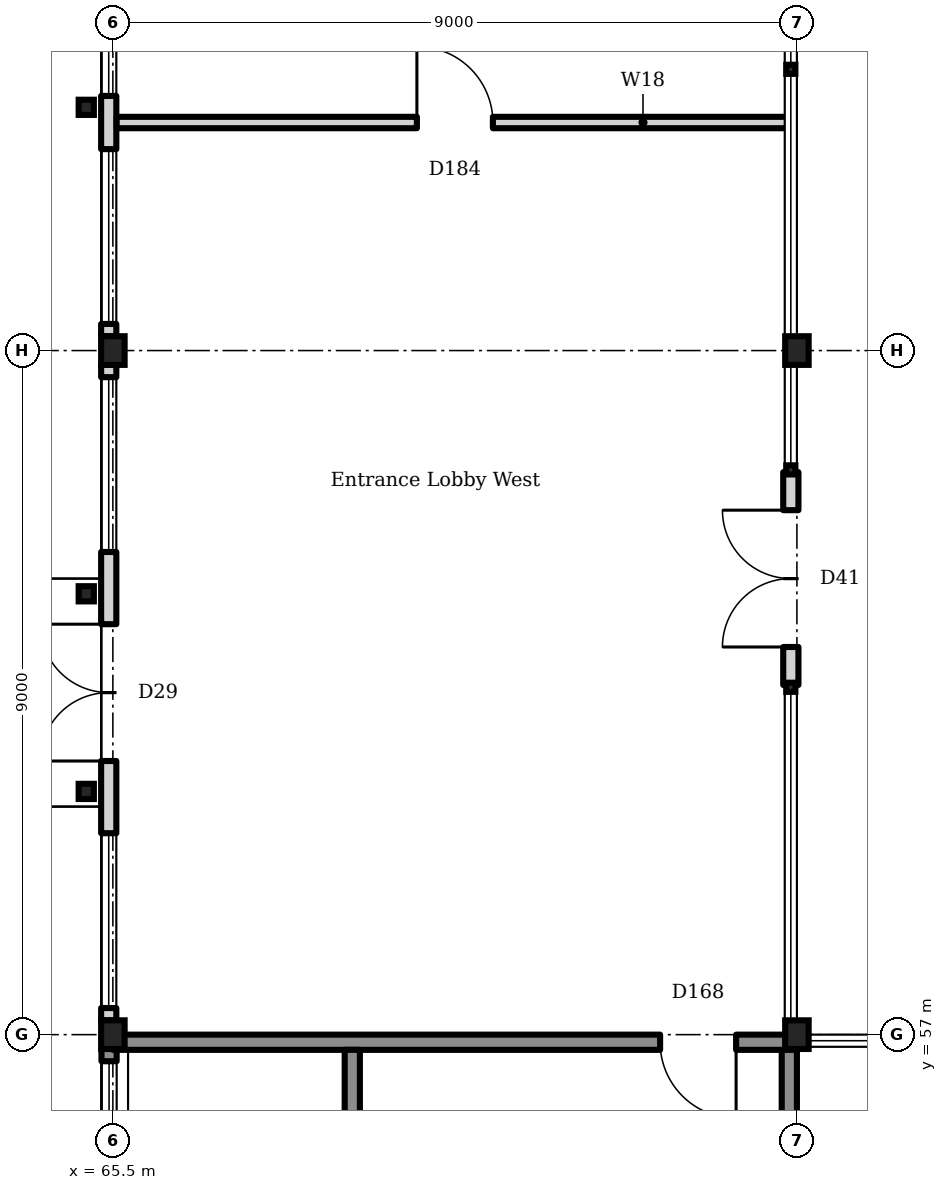
"""IFC4 building model, lengths in metres.
Left out: names, types, materials, properties, quantities, classifications, styles, units other than length and angle.
Written with IfcOpenShell. Run it as: python <this file> out.ifc"""

import sys

from ifc_helpers import new_model, si_unit, direction, frame, frame_2d, origin, origin_2d, place, context, subcontext, project, spatial, rectangle, hollow_rectangle, i_section, extrude, element, fill, save


model = new_model("IFC4")
c1 = context("Model", 3, precision=1e-05, world=origin(), true_north=direction((0.0, 1.0)))
c2 = subcontext(c1, "Body", "Model", "MODEL_VIEW")
j1 = project(units=[si_unit("LENGTHUNIT", "METRE"), si_unit("PLANEANGLEUNIT", "RADIAN")], contexts=[c1])
p1 = place(None, origin())
s1 = spatial("IfcSite", under=j1, at=p1, CompositionType="ELEMENT")
p2 = place(p1, origin())
s2 = spatial("IfcBuilding", under=s1, at=p2, CompositionType="ELEMENT")
p3 = place(p2, origin())
s3 = spatial("IfcBuildingStorey", under=s2, at=p3, CompositionType="ELEMENT", Elevation=0.0)
for number, where, z_axis, x_axis in (
    (1, (65.5, 57.0, 0.0), (0.0, 0.0, 1.0), (1.0, 0.0, 0.0)),
    (2, (74.5, 57.0, 0.0), (0.0, 0.0, 1.0), (1.0, 0.0, 0.0)),
    (3, (65.5, 66.0, 0.0), (0.0, 0.0, 1.0), (1.0, 0.0, 0.0)),
    (4, (74.5, 66.0, 0.0), (0.0, 0.0, 1.0), (1.0, 0.0, 0.0)),
):
    element("IfcColumn", number, at=place(p3, frame(where, z_axis=z_axis, x_axis=x_axis)), inside=s3, PredefinedType="COLUMN", context=c2, shape_type="SweptSolid", body=[
        extrude(i_section(OverallWidth=0.309, OverallDepth=0.377, WebThickness=0.021, FlangeThickness=0.04, FilletRadius=0.027, at=origin_2d()), origin(), (0.0, 0.0, 1.0), 5.4),
    ])
p4 = place(p3, frame((65.45, 48.32, 0.0), z_axis=(0.0, 0.0, 1.0), x_axis=(0.0, 1.0, 0.0)))
e5 = element("IfcWall", 5, at=p4, inside=s3, PredefinedType="SOLIDWALL", context=c2, shape_type="SweptSolid", body=[
    extrude(rectangle(XDim=8.491, YDim=0.2, at=frame_2d((4.246, 0.0))), origin(), (0.0, 0.0, 1.0), 5.2),
])
p5 = place(p4, frame((3.03, 0.0, 0.9)))
e6 = element("IfcOpeningElement", 6, at=p5, cuts=e5, PredefinedType="OPENING", context=c2, shape_type="SweptSolid", body=[
    extrude(rectangle(XDim=2.3, YDim=3.6, at=frame_2d((1.15, 1.8))), frame((0.0, 0.11, 0.0), z_axis=(0.0, -1.0, 0.0), x_axis=(1.0, 0.0, 0.0)), (0.0, 0.0, 1.0), 0.22),
])
p6 = place(p4, frame((6.03, 0.0, 0.9)))
e7 = element("IfcOpeningElement", 7, at=p6, cuts=e5, PredefinedType="OPENING", context=c2, shape_type="SweptSolid", body=[
    extrude(rectangle(XDim=2.3, YDim=3.6, at=frame_2d((1.15, 1.8))), frame((0.0, 0.11, 0.0), z_axis=(0.0, -1.0, 0.0), x_axis=(1.0, 0.0, 0.0)), (0.0, 0.0, 1.0), 0.22),
])
p7 = place(p3, frame((65.446, 57.188, 0.0), z_axis=(0.0, 0.0, 1.0), x_axis=(0.0, 1.0, 0.0)))
e8 = element("IfcWall", 8, at=p7, inside=s3, PredefinedType="SOLIDWALL", context=c2, shape_type="SweptSolid", body=[
    extrude(rectangle(XDim=8.623, YDim=0.2, at=frame_2d((4.312, 0.0))), origin(), (0.0, 0.0, 1.0), 4.65),
])
p8 = place(p7, frame((3.412, 0.0, 0.0)))
e9 = element("IfcOpeningElement", 9, at=p8, cuts=e8, PredefinedType="OPENING", context=c2, shape_type="SweptSolid", body=[
    extrude(rectangle(XDim=1.8, YDim=2.1, at=frame_2d((0.9, 1.05))), frame((0.0, 0.11, 0.0), z_axis=(0.0, -1.0, 0.0), x_axis=(1.0, 0.0, 0.0)), (0.0, 0.0, 1.0), 0.22),
])
p9 = place(p7, frame((0.162, 0.0, 0.9)))
e10 = element("IfcOpeningElement", 10, at=p9, cuts=e8, PredefinedType="OPENING", context=c2, shape_type="SweptSolid", body=[
    extrude(rectangle(XDim=2.3, YDim=3.6, at=frame_2d((1.15, 1.8))), frame((0.0, 0.11, 0.0), z_axis=(0.0, -1.0, 0.0), x_axis=(1.0, 0.0, 0.0)), (0.0, 0.0, 1.0), 0.22),
])
p10 = place(p7, frame((6.162, 0.0, 0.9)))
e11 = element("IfcOpeningElement", 11, at=p10, cuts=e8, PredefinedType="OPENING", context=c2, shape_type="SweptSolid", body=[
    extrude(rectangle(XDim=2.3, YDim=3.6, at=frame_2d((1.15, 1.8))), frame((0.0, 0.11, 0.0), z_axis=(0.0, -1.0, 0.0), x_axis=(1.0, 0.0, 0.0)), (0.0, 0.0, 1.0), 0.22),
])
p11 = place(p3, frame((65.446, 66.188, 0.0), z_axis=(0.0, 0.0, 1.0), x_axis=(0.0, 1.0, 0.0)))
e12 = element("IfcWall", 12, at=p11, inside=s3, PredefinedType="SOLIDWALL", context=c2, shape_type="SweptSolid", body=[
    extrude(rectangle(XDim=8.595, YDim=0.2, at=frame_2d((4.298, 0.0))), origin(), (0.0, 0.0, 1.0), 4.65),
])
p12 = place(p11, frame((0.162, 0.0, 0.9)))
e13 = element("IfcOpeningElement", 13, at=p12, cuts=e12, PredefinedType="OPENING", context=c2, shape_type="SweptSolid", body=[
    extrude(rectangle(XDim=2.3, YDim=3.6, at=frame_2d((1.15, 1.8))), frame((0.0, 0.11, 0.0), z_axis=(0.0, -1.0, 0.0), x_axis=(1.0, 0.0, 0.0)), (0.0, 0.0, 1.0), 0.22),
])
p13 = place(p11, frame((3.162, 0.0, 0.9)))
e14 = element("IfcOpeningElement", 14, at=p13, cuts=e12, PredefinedType="OPENING", context=c2, shape_type="SweptSolid", body=[
    extrude(rectangle(XDim=2.3, YDim=3.6, at=frame_2d((1.15, 1.8))), frame((0.0, 0.11, 0.0), z_axis=(0.0, -1.0, 0.0), x_axis=(1.0, 0.0, 0.0)), (0.0, 0.0, 1.0), 0.22),
])
p14 = place(p11, frame((6.162, 0.0, 0.9)))
e15 = element("IfcOpeningElement", 15, at=p14, cuts=e12, PredefinedType="OPENING", context=c2, shape_type="SweptSolid", body=[
    extrude(rectangle(XDim=2.3, YDim=3.6, at=frame_2d((1.15, 1.8))), frame((0.0, 0.11, 0.0), z_axis=(0.0, -1.0, 0.0), x_axis=(1.0, 0.0, 0.0)), (0.0, 0.0, 1.0), 0.22),
])
p15 = place(p3, frame((74.42, 61.6, 0.0), z_axis=(0.0, 0.0, 1.0), x_axis=(0.0, 1.0, 0.0)))
e16 = element("IfcWall", 16, at=p15, inside=s3, PredefinedType="SOLIDWALL", context=c2, shape_type="SweptSolid", body=[
    extrude(rectangle(XDim=2.8, YDim=0.2, at=frame_2d((1.4, 0.0))), origin(), (0.0, 0.0, 1.0), 4.65),
])
p16 = place(p15, frame((0.5, 0.0, 0.0)))
e17 = element("IfcOpeningElement", 17, at=p16, cuts=e16, PredefinedType="OPENING", context=c2, shape_type="SweptSolid", body=[
    extrude(rectangle(XDim=1.8, YDim=2.1, at=frame_2d((0.9, 1.05))), frame((0.0, 0.11, 0.0), z_axis=(0.0, -1.0, 0.0), x_axis=(1.0, 0.0, 0.0)), (0.0, 0.0, 1.0), 0.22),
])
p17 = place(p3, frame((65.5, 56.9, 0.0), z_axis=(0.0, 0.0, 1.0), x_axis=(1.0, 0.0, 0.0)))
e18 = element("IfcWall", 18, at=p17, inside=s3, PredefinedType="SHEAR", context=c2, shape_type="SweptSolid", body=[
    extrude(rectangle(XDim=9.0, YDim=0.2, at=frame_2d((4.5, 0.0))), origin(), (0.0, 0.0, 1.0), 5.2),
])
p18 = place(p17, frame((7.2, 0.0, 0.0)))
e19 = element("IfcOpeningElement", 19, at=p18, cuts=e18, PredefinedType="OPENING", context=c2, shape_type="SweptSolid", body=[
    extrude(rectangle(XDim=1.0, YDim=2.1, at=frame_2d((0.5, 1.05))), frame((0.0, 0.11, 0.0), z_axis=(0.0, -1.0, 0.0), x_axis=(1.0, 0.0, 0.0)), (0.0, 0.0, 1.0), 0.22),
])
p19 = place(p3, frame((74.4, 48.15, 0.0), z_axis=(0.0, 0.0, 1.0), x_axis=(0.0, 1.0, 0.0)))
e20 = element("IfcWall", 20, at=p19, inside=s3, PredefinedType="SHEAR", context=c2, shape_type="SweptSolid", body=[
    extrude(rectangle(XDim=8.65, YDim=0.2, at=frame_2d((4.325, 0.0))), origin(), (0.0, 0.0, 1.0), 4.65),
])
p20 = place(p19, frame((3.85, 0.0, 0.0)))
e21 = element("IfcOpeningElement", 21, at=p20, cuts=e20, PredefinedType="OPENING", context=c2, shape_type="SweptSolid", body=[
    extrude(rectangle(XDim=1.0, YDim=2.1, at=frame_2d((0.5, 1.05))), frame((0.0, 0.11, 0.0), z_axis=(0.0, -1.0, 0.0), x_axis=(1.0, 0.0, 0.0)), (0.0, 0.0, 1.0), 0.22),
])
p21 = place(p3, frame((68.65, 48.15, 0.0), z_axis=(0.0, 0.0, 1.0), x_axis=(0.0, 1.0, 0.0)))
e22 = element("IfcWall", 22, at=p21, inside=s3, PredefinedType="SHEAR", context=c2, shape_type="SweptSolid", body=[
    extrude(rectangle(XDim=8.65, YDim=0.2, at=frame_2d((4.325, 0.0))), origin(), (0.0, 0.0, 1.0), 5.2),
])
p22 = place(p21, frame((0.35, 0.0, 0.0)))
e23 = element("IfcOpeningElement", 23, at=p22, cuts=e22, PredefinedType="OPENING", context=c2, shape_type="SweptSolid", body=[
    extrude(rectangle(XDim=1.0, YDim=2.1, at=frame_2d((0.5, 1.05))), frame((0.0, 0.11, 0.0), z_axis=(0.0, -1.0, 0.0), x_axis=(1.0, 0.0, 0.0)), (0.0, 0.0, 1.0), 0.22),
])
p23 = place(p3, frame((65.55, 69.0, 0.0), z_axis=(0.0, 0.0, 1.0), x_axis=(1.0, 0.0, 0.0)))
e24 = element("IfcWall", 24, at=p23, inside=s3, PredefinedType="PARTITIONING", context=c2, shape_type="SweptSolid", body=[
    extrude(rectangle(XDim=8.9, YDim=0.15, at=frame_2d((4.45, 0.0))), origin(), (0.0, 0.0, 1.0), 4.6),
])
p24 = place(p23, frame((3.95, 0.0, 0.0)))
e25 = element("IfcOpeningElement", 25, at=p24, cuts=e24, PredefinedType="OPENING", context=c2, shape_type="SweptSolid", body=[
    extrude(rectangle(XDim=1.0, YDim=2.1, at=frame_2d((0.5, 1.05))), frame((0.0, 0.085, 0.0), z_axis=(0.0, -1.0, 0.0), x_axis=(1.0, 0.0, 0.0)), (0.0, 0.0, 1.0), 0.17),
])
for number, where, z_axis, x_axis in (
    (26, (65.15, 60.2, 0.0), (0.0, 0.0, 1.0), (1.0, 0.0, 0.0)),
    (27, (65.15, 62.8, 0.0), (0.0, 0.0, 1.0), (1.0, 0.0, 0.0)),
    (28, (65.15, 69.2, 0.0), (0.0, 0.0, 1.0), (1.0, 0.0, 0.0)),
):
    element("IfcColumn", number, at=place(p3, frame(where, z_axis=z_axis, x_axis=x_axis)), inside=s3, PredefinedType="COLUMN", context=c2, shape_type="SweptSolid", body=[
        extrude(hollow_rectangle(XDim=0.2, YDim=0.2, WallThickness=0.01, InnerFilletRadius=0.01, OuterFilletRadius=0.015, at=origin_2d()), origin(), (0.0, 0.0, 1.0), 5.4),
    ])
p25 = place(p6, origin())
e29 = element("IfcWindow", 29, at=p25, inside=s3, PartitioningType="SINGLE_PANEL", PredefinedType="WINDOW", context=c2, shape_type="SweptSolid", body=[
    extrude(rectangle(XDim=2.3, YDim=3.6, at=frame_2d((1.15, 1.8))), frame((0.0, 0.03, 0.0), z_axis=(0.0, -1.0, 0.0), x_axis=(1.0, 0.0, 0.0)), (0.0, 0.0, 1.0), 0.06),
])
fill(e7, e29)
p26 = place(p8, origin())
e30 = element("IfcDoor", 30, at=p26, inside=s3, OperationType="DOUBLE_DOOR_SINGLE_SWING", PredefinedType="DOOR", context=c2, shape_type="SweptSolid", body=[
    extrude(rectangle(XDim=1.8, YDim=2.1, at=frame_2d((0.9, 1.05))), frame((0.0, 0.025, 0.0), z_axis=(0.0, -1.0, 0.0), x_axis=(1.0, 0.0, 0.0)), (0.0, 0.0, 1.0), 0.05),
])
fill(e9, e30)
p27 = place(p9, origin())
e31 = element("IfcWindow", 31, at=p27, inside=s3, PartitioningType="SINGLE_PANEL", PredefinedType="WINDOW", context=c2, shape_type="SweptSolid", body=[
    extrude(rectangle(XDim=2.3, YDim=3.6, at=frame_2d((1.15, 1.8))), frame((0.0, 0.03, 0.0), z_axis=(0.0, -1.0, 0.0), x_axis=(1.0, 0.0, 0.0)), (0.0, 0.0, 1.0), 0.06),
])
fill(e10, e31)
p28 = place(p10, origin())
e32 = element("IfcWindow", 32, at=p28, inside=s3, PartitioningType="SINGLE_PANEL", PredefinedType="WINDOW", context=c2, shape_type="SweptSolid", body=[
    extrude(rectangle(XDim=2.3, YDim=3.6, at=frame_2d((1.15, 1.8))), frame((0.0, 0.03, 0.0), z_axis=(0.0, -1.0, 0.0), x_axis=(1.0, 0.0, 0.0)), (0.0, 0.0, 1.0), 0.06),
])
fill(e11, e32)
p29 = place(p12, origin())
e33 = element("IfcWindow", 33, at=p29, inside=s3, PartitioningType="SINGLE_PANEL", PredefinedType="WINDOW", context=c2, shape_type="SweptSolid", body=[
    extrude(rectangle(XDim=2.3, YDim=3.6, at=frame_2d((1.15, 1.8))), frame((0.0, 0.03, 0.0), z_axis=(0.0, -1.0, 0.0), x_axis=(1.0, 0.0, 0.0)), (0.0, 0.0, 1.0), 0.06),
])
fill(e13, e33)
p30 = place(p13, origin())
e34 = element("IfcWindow", 34, at=p30, inside=s3, PartitioningType="SINGLE_PANEL", PredefinedType="WINDOW", context=c2, shape_type="SweptSolid", body=[
    extrude(rectangle(XDim=2.3, YDim=3.6, at=frame_2d((1.15, 1.8))), frame((0.0, 0.03, 0.0), z_axis=(0.0, -1.0, 0.0), x_axis=(1.0, 0.0, 0.0)), (0.0, 0.0, 1.0), 0.06),
])
fill(e14, e34)
p31 = place(p16, origin())
e35 = element("IfcDoor", 35, at=p31, inside=s3, OperationType="DOUBLE_DOOR_SINGLE_SWING", PredefinedType="DOOR", context=c2, shape_type="SweptSolid", body=[
    extrude(rectangle(XDim=1.8, YDim=2.1, at=frame_2d((0.9, 1.05))), frame((0.0, 0.025, 0.0), z_axis=(0.0, -1.0, 0.0), x_axis=(1.0, 0.0, 0.0)), (0.0, 0.0, 1.0), 0.05),
])
fill(e17, e35)
p32 = place(p18, frame((1.0, 0.0, 0.0), z_axis=(0.0, 0.0, 1.0), x_axis=(-1.0, 0.0, 0.0)))
e36 = element("IfcDoor", 36, at=p32, inside=s3, OperationType="SINGLE_SWING_RIGHT", PredefinedType="DOOR", context=c2, shape_type="SweptSolid", body=[
    extrude(rectangle(XDim=1.0, YDim=2.1, at=frame_2d((0.5, 1.05))), frame((0.0, 0.025, 0.0), z_axis=(0.0, -1.0, 0.0), x_axis=(1.0, 0.0, 0.0)), (0.0, 0.0, 1.0), 0.05),
])
fill(e19, e36)
p33 = place(p24, origin())
e37 = element("IfcDoor", 37, at=p33, inside=s3, OperationType="SINGLE_SWING_RIGHT", PredefinedType="DOOR", context=c2, shape_type="SweptSolid", body=[
    extrude(rectangle(XDim=1.0, YDim=2.1, at=frame_2d((0.5, 1.05))), frame((0.0, 0.025, 0.0), z_axis=(0.0, -1.0, 0.0), x_axis=(1.0, 0.0, 0.0)), (0.0, 0.0, 1.0), 0.05),
])
fill(e25, e37)
save(model, sys.argv[1])
